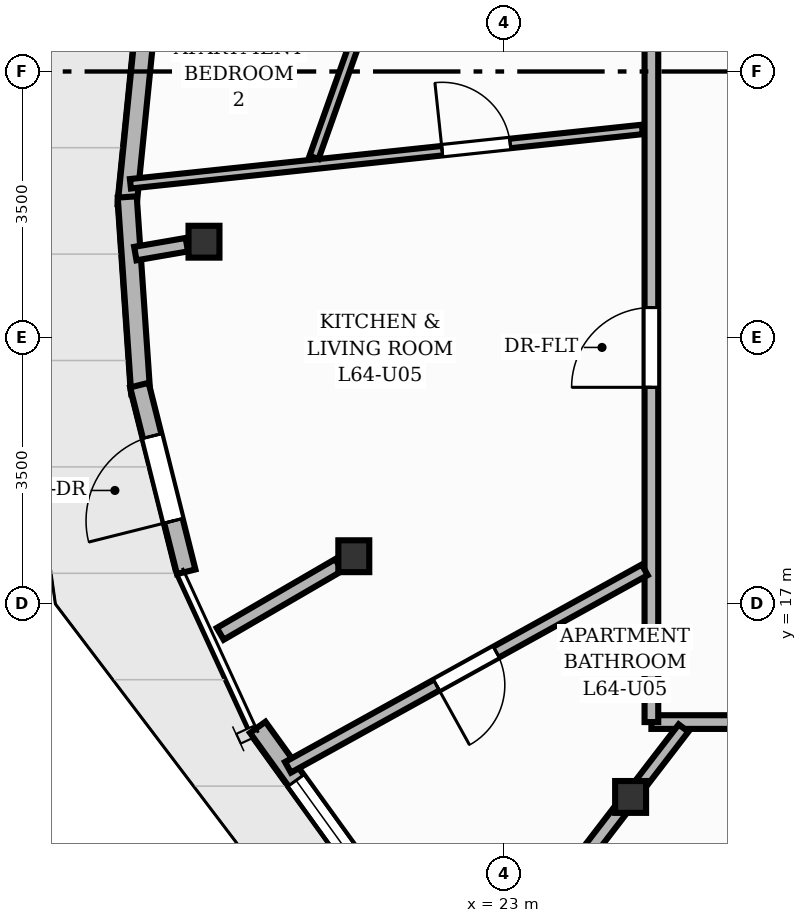
"""IFC4 building model, lengths in metres.
Left out: names, types, materials, properties, quantities, classifications, styles, units other than length and angle.
Written with IfcOpenShell. Run it as: python <this file> out.ifc"""

import sys

from ifc_helpers import new_model, si_unit, direction, frame, frame_2d, origin, origin_2d, place, context, subcontext, project, spatial, rectangle, i_section, extrude, element, fill, save


model = new_model("IFC4")
c1 = context("Model", 3, precision=1e-05, world=origin(), true_north=direction((0.0, 1.0)))
c2 = subcontext(c1, "Body", "Model", "MODEL_VIEW")
j1 = project(units=[si_unit("LENGTHUNIT", "METRE"), si_unit("PLANEANGLEUNIT", "RADIAN")], contexts=[c1])
p1 = place(None, origin())
s1 = spatial("IfcSite", under=j1, at=p1, CompositionType="ELEMENT")
p2 = place(p1, origin())
s2 = spatial("IfcBuilding", under=s1, at=p2, CompositionType="ELEMENT")
p3 = place(p2, frame((0.0, 0.0, 214.24)))
s3 = spatial("IfcBuildingStorey", under=s2, at=p3, CompositionType="ELEMENT", Elevation=214.24)
for number, where, z_axis, x_axis in (
    (1, (19.054, 21.76, 0.0), (0.0, 0.0, 1.0), (1.0, 0.0, 0.0)),
    (2, (21.025, 17.622, 0.0), (0.0, 0.0, 1.0), (1.0, 0.0, 0.0)),
    (3, (24.667, 14.455, 0.0), (0.0, 0.0, 1.0), (1.0, 0.0, 0.0)),
):
    element("IfcColumn", number, at=place(p3, frame(where, z_axis=z_axis, x_axis=x_axis)), inside=s3, PredefinedType="COLUMN", context=c2, shape_type="SweptSolid", body=[
        extrude(i_section(OverallWidth=0.407, OverallDepth=0.419, WebThickness=0.031, FlangeThickness=0.049, at=origin_2d()), origin(), (0.0, 0.0, 1.0), 3.2),
    ])
p4 = place(p3, frame((18.042, 22.239, 0.0), z_axis=(0.0, 0.0, 1.0), x_axis=(0.100196668354, 0.99496765156, 0.0)))
e4 = element("IfcWall", 4, at=p4, inside=s3, PredefinedType="SOLIDWALL", context=c2, shape_type="SweptSolid", body=[
    extrude(rectangle(XDim=2.651, YDim=0.25, at=frame_2d((1.326, 0.0))), origin(), (0.0, 0.0, 1.0), 2.96),
])
p5 = place(p3, frame((18.221, 19.763, 0.0), z_axis=(0.0, 0.0, 1.0), x_axis=(-0.068469168344, 0.997653232835, 0.0)))
e5 = element("IfcWall", 5, at=p5, inside=s3, PredefinedType="SOLIDWALL", context=c2, shape_type="SweptSolid", body=[
    extrude(rectangle(XDim=2.592, YDim=0.25, at=frame_2d((1.296, 0.0))), origin(), (0.0, 0.0, 1.0), 2.96),
])
p6 = place(p3, frame((18.82, 17.417, 0.0), z_axis=(0.0, 0.0, 1.0), x_axis=(-0.243170809566, 0.969983483042, 0.0)))
e6 = element("IfcWall", 6, at=p6, inside=s3, PredefinedType="SOLIDWALL", context=c2, shape_type="SweptSolid", body=[
    extrude(rectangle(XDim=2.532, YDim=0.25, at=frame_2d((1.266, 0.0))), origin(), (0.0, 0.0, 1.0), 2.96),
])
p7 = place(p6, frame((0.691, 0.0, 0.0)))
e7 = element("IfcOpeningElement", 7, at=p7, cuts=e6, PredefinedType="OPENING", context=c2, shape_type="SweptSolid", body=[
    extrude(rectangle(XDim=1.15, YDim=2.2, at=frame_2d((0.575, 1.1))), frame((0.0, 0.135, 0.0), z_axis=(0.0, -1.0, 0.0), x_axis=(1.0, 0.0, 0.0)), (0.0, 0.0, 1.0), 0.27),
])
p8 = place(p3, frame((21.186, 13.395, 0.0), z_axis=(0.0, 0.0, 1.0), x_axis=(-0.584824573101, 0.811159798497, 0.0)))
e8 = element("IfcWall", 8, at=p8, inside=s3, PredefinedType="SOLIDWALL", context=c2, shape_type="SweptSolid", body=[
    extrude(rectangle(XDim=2.437, YDim=0.25, at=frame_2d((1.218, 0.0))), origin(), (0.0, 0.0, 1.0), 2.96),
])
p9 = place(p8, frame((0.175, 0.0, 0.85)))
e9 = element("IfcOpeningElement", 9, at=p9, cuts=e8, PredefinedType="OPENING", context=c2, shape_type="SweptSolid", body=[
    extrude(rectangle(XDim=1.4, YDim=1.55, at=frame_2d((0.7, 0.775))), frame((0.0, 0.135, 0.0), z_axis=(0.0, -1.0, 0.0), x_axis=(1.0, 0.0, 0.0)), (0.0, 0.0, 1.0), 0.27),
])
p10 = place(p3, frame((18.827, 21.721, 0.0), z_axis=(0.0, 0.0, 1.0), x_axis=(-0.985357392461, -0.170501639647, 0.0)))
e10 = element("IfcWall", 10, at=p10, inside=s3, PredefinedType="PARTITIONING", context=c2, shape_type="SweptSolid", body=[
    extrude(rectangle(XDim=0.687, YDim=0.18, at=frame_2d((0.344, 0.0))), origin(), (0.0, 0.0, 1.0), 2.403),
])
p11 = place(p3, frame((20.826, 17.507, 0.0), z_axis=(0.0, 0.0, 1.0), x_axis=(-0.864637155841, -0.502396843879, 0.0)))
e11 = element("IfcWall", 11, at=p11, inside=s3, PredefinedType="PARTITIONING", context=c2, shape_type="SweptSolid", body=[
    extrude(rectangle(XDim=1.803, YDim=0.18, at=frame_2d((0.901, 0.0))), origin(), (0.0, 0.0, 1.0), 2.403),
])
p12 = place(p3, frame((24.527, 14.273, 0.0), z_axis=(0.0, 0.0, 1.0), x_axis=(-0.609244614772, -0.792982344931, 0.0)))
e12 = element("IfcWall", 12, at=p12, inside=s3, PredefinedType="PARTITIONING", context=c2, shape_type="SweptSolid", body=[
    extrude(rectangle(XDim=2.861, YDim=0.18, at=frame_2d((1.43, 0.0))), origin(), (0.0, 0.0, 1.0), 2.403),
])
p13 = place(p3, frame((30.74, 15.44, 0.0), z_axis=(0.0, 0.0, 1.0), x_axis=(-1.0, 0.0, 0.0)))
e13 = element("IfcWall", 13, at=p13, inside=s3, PredefinedType="PARTITIONING", context=c2, shape_type="SweptSolid", body=[
    extrude(rectangle(XDim=5.8, YDim=0.18, at=frame_2d((2.9, 0.0))), origin(), (0.0, 0.0, 1.0), 2.955),
])
p14 = place(p13, frame((2.221, 0.0, 0.0)))
e14 = element("IfcOpeningElement", 14, at=p14, cuts=e13, PredefinedType="OPENING", context=c2, shape_type="SweptSolid", body=[
    extrude(rectangle(XDim=0.9, YDim=2.1, at=frame_2d((0.45, 1.05))), frame((0.0, 0.1, 0.0), z_axis=(0.0, -1.0, 0.0), x_axis=(1.0, 0.0, 0.0)), (0.0, 0.0, 1.0), 0.2),
])
p15 = place(p3, frame((24.94, 15.44, 0.0), z_axis=(0.0, 0.0, 1.0), x_axis=(0.0, 1.0, 0.0)))
e15 = element("IfcWall", 15, at=p15, inside=s3, PredefinedType="PARTITIONING", context=c2, shape_type="SweptSolid", body=[
    extrude(rectangle(XDim=17.12, YDim=0.18, at=frame_2d((8.56, 0.0))), origin(), (0.0, 0.0, 1.0), 2.955),
])
p16 = place(p15, frame((4.404, 0.0, 0.0)))
e16 = element("IfcOpeningElement", 16, at=p16, cuts=e15, PredefinedType="OPENING", context=c2, shape_type="SweptSolid", body=[
    extrude(rectangle(XDim=1.05, YDim=2.15, at=frame_2d((0.525, 1.075))), frame((0.0, 0.1, 0.0), z_axis=(0.0, -1.0, 0.0), x_axis=(1.0, 0.0, 0.0)), (0.0, 0.0, 1.0), 0.2),
])
p17 = place(p3, frame((24.806, 14.636, 0.0), z_axis=(0.0, 0.0, 1.0), x_axis=(0.609284308489, 0.792951846854, 0.0)))
e17 = element("IfcWall", 17, at=p17, inside=s3, PredefinedType="PLUMBINGWALL", context=c2, shape_type="SweptSolid", body=[
    extrude(rectangle(XDim=0.913, YDim=0.16, at=frame_2d((0.457, 0.0))), origin(), (0.0, 0.0, 1.0), 2.403),
])
p18 = place(p3, frame((24.853, 17.443, 0.0), z_axis=(0.0, 0.0, 1.0), x_axis=(-0.874969642777, -0.484177781624, 0.0)))
e18 = element("IfcWall", 18, at=p18, inside=s3, PredefinedType="PLUMBINGWALL", context=c2, shape_type="SweptSolid", body=[
    extrude(rectangle(XDim=5.365, YDim=0.16, at=frame_2d((2.682, 0.0))), origin(), (0.0, 0.0, 1.0), 2.955),
])
p19 = place(p18, frame((2.232, 0.0, 0.0)))
e19 = element("IfcOpeningElement", 19, at=p19, cuts=e18, PredefinedType="OPENING", context=c2, shape_type="SweptSolid", body=[
    extrude(rectangle(XDim=0.9, YDim=2.1, at=frame_2d((0.45, 1.05))), frame((0.0, 0.09, 0.0), z_axis=(0.0, -1.0, 0.0), x_axis=(1.0, 0.0, 0.0)), (0.0, 0.0, 1.0), 0.18),
])
p20 = place(p3, frame((18.086, 22.522, 0.0), z_axis=(0.0, 0.0, 1.0), x_axis=(0.994410835851, 0.105579778091, 0.0)))
e20 = element("IfcWall", 20, at=p20, inside=s3, PredefinedType="PARTITIONING", context=c2, shape_type="SweptSolid", body=[
    extrude(rectangle(XDim=6.773, YDim=0.125, at=frame_2d((3.386, 0.0))), origin(), (0.0, 0.0, 1.0), 2.955),
])
p21 = place(p20, frame((4.124, 0.0, 0.0)))
e21 = element("IfcOpeningElement", 21, at=p21, cuts=e20, PredefinedType="OPENING", context=c2, shape_type="SweptSolid", body=[
    extrude(rectangle(XDim=0.9, YDim=2.1, at=frame_2d((0.45, 1.05))), frame((0.0, 0.073, 0.0), z_axis=(0.0, -1.0, 0.0), x_axis=(1.0, 0.0, 0.0)), (0.0, 0.0, 1.0), 0.145),
])
p22 = place(p3, frame((20.501, 22.87, 0.0), z_axis=(0.0, 0.0, 1.0), x_axis=(0.334686593727, 0.942329498625, 0.0)))
e22 = element("IfcWall", 22, at=p22, inside=s3, PredefinedType="PARTITIONING", context=c2, shape_type="SweptSolid", body=[
    extrude(rectangle(XDim=11.525, YDim=0.125, at=frame_2d((5.762, 0.0))), origin(), (0.0, 0.0, 1.0), 2.488),
])
p23 = place(p22, frame((5.312, 0.0, 0.0)))
e23 = element("IfcOpeningElement", 23, at=p23, cuts=e22, PredefinedType="OPENING", context=c2, shape_type="SweptSolid", body=[
    extrude(rectangle(XDim=0.9, YDim=2.1, at=frame_2d((0.45, 1.05))), frame((0.0, 0.073, 0.0), z_axis=(0.0, -1.0, 0.0), x_axis=(1.0, 0.0, 0.0)), (0.0, 0.0, 1.0), 0.145),
])
p24 = place(p7, origin())
e24 = element("IfcDoor", 24, at=p24, inside=s3, OperationType="SINGLE_SWING_LEFT", PredefinedType="DOOR", context=c2, shape_type="SweptSolid", body=[
    extrude(rectangle(XDim=1.15, YDim=2.2, at=frame_2d((0.575, 1.1))), frame((0.0, 0.025, 0.0), z_axis=(0.0, -1.0, 0.0), x_axis=(1.0, 0.0, 0.0)), (0.0, 0.0, 1.0), 0.05),
])
fill(e7, e24)
p25 = place(p9, origin())
e25 = element("IfcWindow", 25, at=p25, inside=s3, PartitioningType="SINGLE_PANEL", PredefinedType="WINDOW", context=c2, shape_type="SweptSolid", body=[
    extrude(rectangle(XDim=1.4, YDim=1.55, at=frame_2d((0.7, 0.775))), frame((0.0, 0.03, 0.0), z_axis=(0.0, -1.0, 0.0), x_axis=(1.0, 0.0, 0.0)), (0.0, 0.0, 1.0), 0.06),
])
fill(e9, e25)
p26 = place(p16, origin())
e26 = element("IfcDoor", 26, at=p26, inside=s3, OperationType="SINGLE_SWING_LEFT", PredefinedType="DOOR", context=c2, shape_type="SweptSolid", body=[
    extrude(rectangle(XDim=1.05, YDim=2.15, at=frame_2d((0.525, 1.075))), frame((0.0, 0.025, 0.0), z_axis=(0.0, -1.0, 0.0), x_axis=(1.0, 0.0, 0.0)), (0.0, 0.0, 1.0), 0.05),
])
fill(e16, e26)
p27 = place(p19, origin())
e27 = element("IfcDoor", 27, at=p27, inside=s3, OperationType="SINGLE_SWING_RIGHT", PredefinedType="DOOR", context=c2, shape_type="SweptSolid", body=[
    extrude(rectangle(XDim=0.9, YDim=2.1, at=frame_2d((0.45, 1.05))), frame((0.0, 0.025, 0.0), z_axis=(0.0, -1.0, 0.0), x_axis=(1.0, 0.0, 0.0)), (0.0, 0.0, 1.0), 0.05),
])
fill(e19, e27)
p28 = place(p21, origin())
e28 = element("IfcDoor", 28, at=p28, inside=s3, OperationType="SINGLE_SWING_LEFT", PredefinedType="DOOR", context=c2, shape_type="SweptSolid", body=[
    extrude(rectangle(XDim=0.9, YDim=2.1, at=frame_2d((0.45, 1.05))), frame((0.0, 0.025, 0.0), z_axis=(0.0, -1.0, 0.0), x_axis=(1.0, 0.0, 0.0)), (0.0, 0.0, 1.0), 0.05),
])
fill(e21, e28)
save(model, sys.argv[1])
